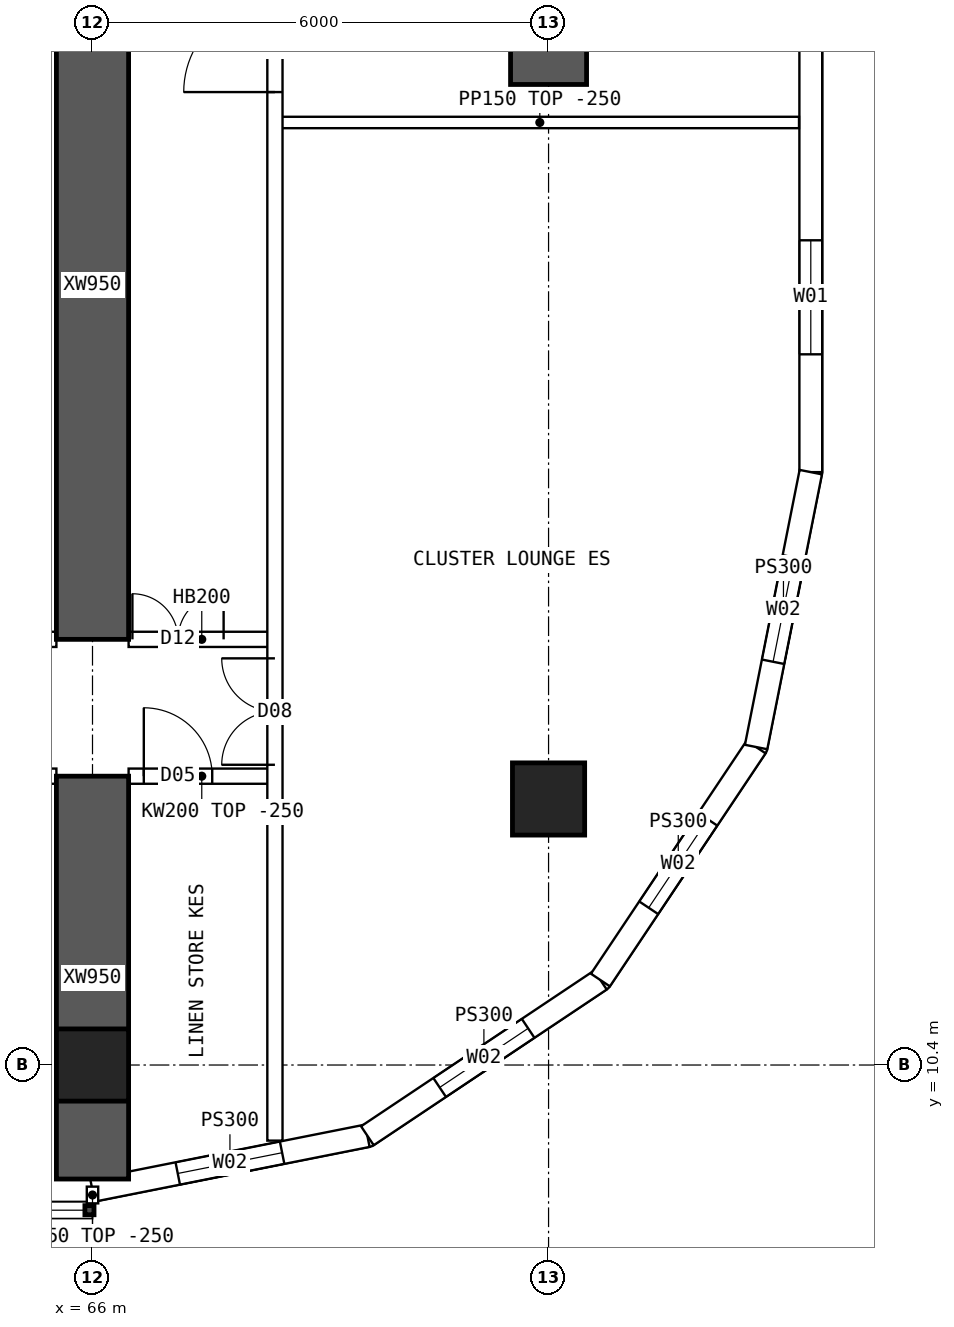
"""IFC4 building model, lengths in metres.
Left out: names, types, materials, properties, quantities, classifications, styles, units other than length and angle.
Written with IfcOpenShell. Run it as: python <this file> out.ifc"""

import sys

from ifc_helpers import new_model, si_unit, direction, frame, frame_2d, origin, origin_2d, place, context, subcontext, project, spatial, polyline, rectangle, hollow_rectangle, outline, extrude, element, fill, save


model = new_model("IFC4")
c1 = context("Model", 3, precision=1e-05, world=origin(), true_north=direction((0.0, 1.0)))
c2 = subcontext(c1, "Body", "Model", "MODEL_VIEW")
j1 = project(units=[si_unit("LENGTHUNIT", "METRE"), si_unit("PLANEANGLEUNIT", "RADIAN")], contexts=[c1])
p1 = place(None, origin())
s1 = spatial("IfcSite", under=j1, at=p1, CompositionType="ELEMENT")
p2 = place(p1, origin())
s2 = spatial("IfcBuilding", under=s1, at=p2, CompositionType="ELEMENT")
p3 = place(p2, frame((0.0, 0.0, 114.4)))
s3 = spatial("IfcBuildingStorey", under=s2, at=p3, CompositionType="ELEMENT", Elevation=114.4)
for number, where, z_axis, x_axis in (
    (1, (66.0, 10.4, 0.0), (0.0, 0.0, 1.0), (1.0, 0.0, 0.0)),
    (2, (72.0, 13.9, 0.0), (0.0, 0.0, 1.0), (1.0, 0.0, 0.0)),
):
    element("IfcColumn", number, at=place(p3, frame(where, z_axis=z_axis, x_axis=x_axis)), inside=s3, PredefinedType="COLUMN", context=c2, shape_type="SweptSolid", body=[
        extrude(hollow_rectangle(XDim=0.95, YDim=0.95, WallThickness=0.095, at=origin_2d()), origin(), (0.0, 0.0, 1.0), 3.75),
    ])
p4 = place(p3, frame((72.0, 23.3, 0.0), z_axis=(0.0, 0.0, 1.0), x_axis=(0.0, 1.0, 0.0)))
e3 = element("IfcWall", 3, at=p4, inside=s3, PredefinedType="SHEAR", context=c2, shape_type="SweptSolid", body=[
    extrude(rectangle(XDim=5.0, YDim=1.0, at=frame_2d((2.5, 0.0))), origin(), (0.0, 0.0, 1.0), 3.75),
])
p5 = place(p3, frame((66.0, 8.9, 0.0), z_axis=(0.0, 0.0, 1.0), x_axis=(0.0, 1.0, 0.0)))
e4 = element("IfcWall", 4, at=p5, inside=s3, PredefinedType="SHEAR", context=c2, shape_type="SweptSolid", body=[
    extrude(rectangle(XDim=5.3, YDim=0.95, at=frame_2d((2.65, 0.0))), origin(), (0.0, 0.0, 1.0), 3.75),
])
p6 = place(p3, frame((66.0, 16.0, 0.0), z_axis=(0.0, 0.0, 1.0), x_axis=(0.0, 1.0, 0.0)))
e5 = element("IfcWall", 5, at=p6, inside=s3, PredefinedType="SHEAR", context=c2, shape_type="SweptSolid", body=[
    extrude(rectangle(XDim=9.325, YDim=0.95, at=frame_2d((4.663, 0.0))), origin(), (0.0, 0.0, 1.0), 3.75),
])
p7 = place(p3, frame((75.45, 18.2, 0.0), z_axis=(0.0, 0.0, 1.0), x_axis=(0.0, 1.0, 0.0)))
e6 = element("IfcWall", 6, at=p7, inside=s3, PredefinedType="SOLIDWALL", context=c2, shape_type="SweptSolid", body=[
    extrude(outline(polyline([(-0.015, -0.15), (27.615, -0.15), (27.585, 0.15), (0.015, 0.15), (-0.015, -0.15)])), origin(), (0.0, 0.0, 1.0), 3.5),
])
p8 = place(p7, frame((1.55, 0.0, 0.9)))
e7 = element("IfcOpeningElement", 7, at=p8, cuts=e6, PredefinedType="OPENING", context=c2, shape_type="SweptSolid", body=[
    extrude(rectangle(XDim=1.5, YDim=2.0, at=frame_2d((0.75, 1.0))), frame((0.0, 0.16, 0.0), z_axis=(0.0, -1.0, 0.0), x_axis=(1.0, 0.0, 0.0)), (0.0, 0.0, 1.0), 0.32),
])
p9 = place(p7, frame((6.15, 0.0, 0.9)))
e8 = element("IfcOpeningElement", 8, at=p9, cuts=e6, PredefinedType="OPENING", context=c2, shape_type="SweptSolid", body=[
    extrude(rectangle(XDim=1.5, YDim=2.0, at=frame_2d((0.75, 1.0))), frame((0.0, 0.16, 0.0), z_axis=(0.0, -1.0, 0.0), x_axis=(1.0, 0.0, 0.0)), (0.0, 0.0, 1.0), 0.32),
])
p10 = place(p7, frame((10.75, 0.0, 0.9)))
e9 = element("IfcOpeningElement", 9, at=p10, cuts=e6, PredefinedType="OPENING", context=c2, shape_type="SweptSolid", body=[
    extrude(rectangle(XDim=1.5, YDim=2.0, at=frame_2d((0.75, 1.0))), frame((0.0, 0.16, 0.0), z_axis=(0.0, -1.0, 0.0), x_axis=(1.0, 0.0, 0.0)), (0.0, 0.0, 1.0), 0.32),
])
p11 = place(p7, frame((15.35, 0.0, 0.9)))
e10 = element("IfcOpeningElement", 10, at=p11, cuts=e6, PredefinedType="OPENING", context=c2, shape_type="SweptSolid", body=[
    extrude(rectangle(XDim=1.5, YDim=2.0, at=frame_2d((0.75, 1.0))), frame((0.0, 0.16, 0.0), z_axis=(0.0, -1.0, 0.0), x_axis=(1.0, 0.0, 0.0)), (0.0, 0.0, 1.0), 0.32),
])
p12 = place(p7, frame((19.95, 0.0, 0.9)))
e11 = element("IfcOpeningElement", 11, at=p12, cuts=e6, PredefinedType="OPENING", context=c2, shape_type="SweptSolid", body=[
    extrude(rectangle(XDim=1.5, YDim=2.0, at=frame_2d((0.75, 1.0))), frame((0.0, 0.16, 0.0), z_axis=(0.0, -1.0, 0.0), x_axis=(1.0, 0.0, 0.0)), (0.0, 0.0, 1.0), 0.32),
])
p13 = place(p7, frame((24.55, 0.0, 0.9)))
e12 = element("IfcOpeningElement", 12, at=p13, cuts=e6, PredefinedType="OPENING", context=c2, shape_type="SweptSolid", body=[
    extrude(rectangle(XDim=1.5, YDim=2.0, at=frame_2d((0.75, 1.0))), frame((0.0, 0.16, 0.0), z_axis=(0.0, -1.0, 0.0), x_axis=(1.0, 0.0, 0.0)), (0.0, 0.0, 1.0), 0.32),
])
p14 = place(p3, frame((66.0, 8.75, 0.0), z_axis=(0.0, 0.0, 1.0), x_axis=(0.980791473772, 0.195059183267, 0.0)))
e13 = element("IfcWall", 13, at=p14, inside=s3, PredefinedType="SOLIDWALL", context=c2, shape_type="SweptSolid", body=[
    extrude(outline(polyline([(-0.03, -0.15), (3.717, -0.15), (3.657, 0.15), (0.03, 0.15), (-0.03, -0.15)])), origin(), (0.0, 0.0, 1.0), 3.5),
])
p15 = place(p14, frame((1.144, 0.0, 0.9)))
e14 = element("IfcOpeningElement", 14, at=p15, cuts=e13, PredefinedType="OPENING", context=c2, shape_type="SweptSolid", body=[
    extrude(rectangle(XDim=1.4, YDim=1.8, at=frame_2d((0.7, 0.9))), frame((0.0, 0.16, 0.0), z_axis=(0.0, -1.0, 0.0), x_axis=(1.0, 0.0, 0.0)), (0.0, 0.0, 1.0), 0.32),
])
p16 = place(p3, frame((69.616, 9.469, 0.0), z_axis=(0.0, 0.0, 1.0), x_axis=(0.831448786846, 0.555601399253, 0.0)))
e15 = element("IfcWall", 15, at=p16, inside=s3, PredefinedType="SOLIDWALL", context=c2, shape_type="SweptSolid", body=[
    extrude(outline(polyline([(-0.03, -0.15), (3.717, -0.15), (3.657, 0.15), (0.03, 0.15), (-0.03, -0.15)])), origin(), (0.0, 0.0, 1.0), 3.5),
])
p17 = place(p16, frame((1.144, 0.0, 0.9)))
e16 = element("IfcOpeningElement", 16, at=p17, cuts=e15, PredefinedType="OPENING", context=c2, shape_type="SweptSolid", body=[
    extrude(rectangle(XDim=1.4, YDim=1.8, at=frame_2d((0.7, 0.9))), frame((0.0, 0.16, 0.0), z_axis=(0.0, -1.0, 0.0), x_axis=(1.0, 0.0, 0.0)), (0.0, 0.0, 1.0), 0.32),
])
p18 = place(p3, frame((72.682, 11.518, 0.0), z_axis=(0.0, 0.0, 1.0), x_axis=(0.555601399253, 0.831448786846, 0.0)))
e17 = element("IfcWall", 17, at=p18, inside=s3, PredefinedType="SOLIDWALL", context=c2, shape_type="SweptSolid", body=[
    extrude(outline(polyline([(-0.03, -0.15), (3.717, -0.15), (3.657, 0.15), (0.03, 0.15), (-0.03, -0.15)])), origin(), (0.0, 0.0, 1.0), 3.5),
])
p19 = place(p18, frame((1.144, 0.0, 0.9)))
e18 = element("IfcOpeningElement", 18, at=p19, cuts=e17, PredefinedType="OPENING", context=c2, shape_type="SweptSolid", body=[
    extrude(rectangle(XDim=1.4, YDim=1.8, at=frame_2d((0.7, 0.9))), frame((0.0, 0.16, 0.0), z_axis=(0.0, -1.0, 0.0), x_axis=(1.0, 0.0, 0.0)), (0.0, 0.0, 1.0), 0.32),
])
p20 = place(p3, frame((74.731, 14.583, 0.0), z_axis=(0.0, 0.0, 1.0), x_axis=(0.195059183267, 0.980791473772, 0.0)))
e19 = element("IfcWall", 19, at=p20, inside=s3, PredefinedType="SOLIDWALL", context=c2, shape_type="SweptSolid", body=[
    extrude(outline(polyline([(-0.03, -0.15), (3.702, -0.15), (3.672, 0.15), (0.03, 0.15), (-0.03, -0.15)])), origin(), (0.0, 0.0, 1.0), 3.5),
])
p21 = place(p20, frame((1.144, 0.0, 0.9)))
e20 = element("IfcOpeningElement", 20, at=p21, cuts=e19, PredefinedType="OPENING", context=c2, shape_type="SweptSolid", body=[
    extrude(rectangle(XDim=1.4, YDim=1.8, at=frame_2d((0.7, 0.9))), frame((0.0, 0.16, 0.0), z_axis=(0.0, -1.0, 0.0), x_axis=(1.0, 0.0, 0.0)), (0.0, 0.0, 1.0), 0.32),
])
p22 = place(p3, frame((60.475, 14.2, 0.0), z_axis=(0.0, 0.0, 1.0), x_axis=(1.0, 0.0, 0.0)))
e21 = element("IfcWall", 21, at=p22, inside=s3, PredefinedType="SOLIDWALL", context=c2, shape_type="SweptSolid", body=[
    extrude(outline(polyline([(0.0, 0.0), (5.05, 0.0), (5.05, 3.1), (0.0, 3.1), (0.0, 0.0)])), frame((0.0, 0.1, 0.0), z_axis=(0.0, -1.0, 0.0), x_axis=(1.0, 0.0, 0.0)), (0.0, 0.0, 1.0), 0.2),
])
p23 = place(p22, frame((0.1, 0.0, 0.0)))
e22 = element("IfcOpeningElement", 22, at=p23, cuts=e21, PredefinedType="OPENING", context=c2, shape_type="SweptSolid", body=[
    extrude(rectangle(XDim=0.9, YDim=2.1, at=frame_2d((0.45, 1.05))), frame((0.0, 0.11, 0.0), z_axis=(0.0, -1.0, 0.0), x_axis=(1.0, 0.0, 0.0)), (0.0, 0.0, 1.0), 0.22),
])
p24 = place(p22, frame((3.9, 0.0, 0.0)))
e23 = element("IfcOpeningElement", 23, at=p24, cuts=e21, PredefinedType="OPENING", context=c2, shape_type="SweptSolid", body=[
    extrude(rectangle(XDim=0.9, YDim=2.1, at=frame_2d((0.45, 1.05))), frame((0.0, 0.11, 0.0), z_axis=(0.0, -1.0, 0.0), x_axis=(1.0, 0.0, 0.0)), (0.0, 0.0, 1.0), 0.22),
])
p25 = place(p3, frame((60.475, 16.0, 0.0), z_axis=(0.0, 0.0, 1.0), x_axis=(1.0, 0.0, 0.0)))
e24 = element("IfcWall", 24, at=p25, inside=s3, PredefinedType="SOLIDWALL", context=c2, shape_type="SweptSolid", body=[
    extrude(rectangle(XDim=5.05, YDim=0.2, at=frame_2d((2.525, 0.0))), origin(), (0.0, 0.0, 1.0), 3.5),
])
p26 = place(p25, frame((0.15, 0.0, 0.0)))
e25 = element("IfcOpeningElement", 25, at=p26, cuts=e24, PredefinedType="OPENING", context=c2, shape_type="SweptSolid", body=[
    extrude(rectangle(XDim=0.9, YDim=2.1, at=frame_2d((0.45, 1.05))), frame((0.0, 0.11, 0.0), z_axis=(0.0, -1.0, 0.0), x_axis=(1.0, 0.0, 0.0)), (0.0, 0.0, 1.0), 0.22),
])
p27 = place(p25, frame((3.235, 0.0, 0.0)))
e26 = element("IfcOpeningElement", 26, at=p27, cuts=e24, PredefinedType="OPENING", context=c2, shape_type="SweptSolid", body=[
    extrude(rectangle(XDim=0.9, YDim=2.1, at=frame_2d((0.45, 1.05))), frame((0.0, 0.11, 0.0), z_axis=(0.0, -1.0, 0.0), x_axis=(1.0, 0.0, 0.0)), (0.0, 0.0, 1.0), 0.22),
])
p28 = place(p3, frame((66.475, 14.2, 0.0), z_axis=(0.0, 0.0, 1.0), x_axis=(1.0, 0.0, 0.0)))
e27 = element("IfcWall", 27, at=p28, inside=s3, PredefinedType="SOLIDWALL", context=c2, shape_type="SweptSolid", body=[
    extrude(rectangle(XDim=1.925, YDim=0.2, at=frame_2d((0.962, 0.0))), origin(), (0.0, 0.0, 1.0), 3.5),
])
p29 = place(p28, frame((0.2, 0.0, 0.0)))
e28 = element("IfcOpeningElement", 28, at=p29, cuts=e27, PredefinedType="OPENING", context=c2, shape_type="SweptSolid", body=[
    extrude(rectangle(XDim=0.9, YDim=2.1, at=frame_2d((0.45, 1.05))), frame((0.0, 0.11, 0.0), z_axis=(0.0, -1.0, 0.0), x_axis=(1.0, 0.0, 0.0)), (0.0, 0.0, 1.0), 0.22),
])
p30 = place(p3, frame((66.475, 16.0, 0.0), z_axis=(0.0, 0.0, 1.0), x_axis=(1.0, 0.0, 0.0)))
e29 = element("IfcWall", 29, at=p30, inside=s3, PredefinedType="SOLIDWALL", context=c2, shape_type="SweptSolid", body=[
    extrude(rectangle(XDim=1.925, YDim=0.2, at=frame_2d((0.962, 0.0))), origin(), (0.0, 0.0, 1.0), 3.5),
])
p31 = place(p30, frame((0.05, 0.0, 0.0)))
e30 = element("IfcOpeningElement", 30, at=p31, cuts=e29, PredefinedType="OPENING", context=c2, shape_type="SweptSolid", body=[
    extrude(rectangle(XDim=1.2, YDim=2.1, at=frame_2d((0.6, 1.05))), frame((0.0, 0.11, 0.0), z_axis=(0.0, -1.0, 0.0), x_axis=(1.0, 0.0, 0.0)), (0.0, 0.0, 1.0), 0.22),
])
p32 = place(p3, frame((68.4, 9.405, 0.0), z_axis=(0.0, 0.0, 1.0), x_axis=(0.0, 1.0, 0.0)))
e31 = element("IfcWall", 31, at=p32, inside=s3, PredefinedType="SOLIDWALL", context=c2, shape_type="SweptSolid", body=[
    extrude(rectangle(XDim=45.189, YDim=0.2, at=frame_2d((22.595, 0.0))), origin(), (0.0, 0.0, 1.0), 3.5),
])
p33 = place(p32, frame((13.795, 0.0, 0.0)))
e32 = element("IfcOpeningElement", 32, at=p33, cuts=e31, PredefinedType="OPENING", context=c2, shape_type="SweptSolid", body=[
    extrude(rectangle(XDim=1.2, YDim=2.1, at=frame_2d((0.6, 1.05))), frame((0.0, 0.11, 0.0), z_axis=(0.0, -1.0, 0.0), x_axis=(1.0, 0.0, 0.0)), (0.0, 0.0, 1.0), 0.22),
])
p34 = place(p32, frame((4.945, 0.0, 0.0)))
e33 = element("IfcOpeningElement", 33, at=p34, cuts=e31, PredefinedType="OPENING", context=c2, shape_type="SweptSolid", body=[
    extrude(rectangle(XDim=1.4, YDim=2.1, at=frame_2d((0.7, 1.05))), frame((0.0, 0.11, 0.0), z_axis=(0.0, -1.0, 0.0), x_axis=(1.0, 0.0, 0.0)), (0.0, 0.0, 1.0), 0.22),
])
p35 = place(p32, frame((38.745, 0.0, 0.0)))
e34 = element("IfcOpeningElement", 34, at=p35, cuts=e31, PredefinedType="OPENING", context=c2, shape_type="SweptSolid", body=[
    extrude(rectangle(XDim=1.4, YDim=2.1, at=frame_2d((0.7, 1.05))), frame((0.0, 0.11, 0.0), z_axis=(0.0, -1.0, 0.0), x_axis=(1.0, 0.0, 0.0)), (0.0, 0.0, 1.0), 0.22),
])
p36 = place(p3, frame((68.475, 22.8, 0.0), z_axis=(0.0, 0.0, 1.0), x_axis=(1.0, 0.0, 0.0)))
e35 = element("IfcWall", 35, at=p36, inside=s3, PredefinedType="PARTITIONING", context=c2, shape_type="SweptSolid", body=[
    extrude(outline(polyline([(0.0, 0.0), (6.82, 0.0), (6.82, 3.5), (3.827, 3.5), (3.825, 3.05), (3.227, 3.05), (3.225, 3.5), (0.0, 3.5), (0.0, 0.0)])), frame((0.0, 0.075, 0.0), z_axis=(0.0, -1.0, 0.0), x_axis=(1.0, 0.0, 0.0)), (0.0, 0.0, 1.0), 0.15),
])
p37 = place(p3, frame((66.0, 8.8, 0.0), z_axis=(0.0, 0.0, 1.0), x_axis=(0.0, -1.0, 0.0)))
e36 = element("IfcWall", 36, at=p37, inside=s3, PredefinedType="PARTITIONING", context=c2, shape_type="SweptSolid", body=[
    extrude(rectangle(XDim=0.22, YDim=0.15, at=frame_2d((0.11, 0.0))), origin(), (0.0, 0.0, 1.0), 3.5),
])
p38 = place(p8, origin())
e37 = element("IfcWindow", 37, at=p38, inside=s3, PartitioningType="SINGLE_PANEL", PredefinedType="WINDOW", context=c2, shape_type="SweptSolid", body=[
    extrude(rectangle(XDim=1.5, YDim=2.0, at=frame_2d((0.75, 1.0))), frame((0.0, 0.03, 0.0), z_axis=(0.0, -1.0, 0.0), x_axis=(1.0, 0.0, 0.0)), (0.0, 0.0, 1.0), 0.06),
])
fill(e7, e37)
p39 = place(p15, origin())
e38 = element("IfcWindow", 38, at=p39, inside=s3, PartitioningType="SINGLE_PANEL", PredefinedType="WINDOW", context=c2, shape_type="SweptSolid", body=[
    extrude(rectangle(XDim=1.4, YDim=1.8, at=frame_2d((0.7, 0.9))), frame((0.0, 0.03, 0.0), z_axis=(0.0, -1.0, 0.0), x_axis=(1.0, 0.0, 0.0)), (0.0, 0.0, 1.0), 0.06),
])
fill(e14, e38)
p40 = place(p17, origin())
e39 = element("IfcWindow", 39, at=p40, inside=s3, PartitioningType="SINGLE_PANEL", PredefinedType="WINDOW", context=c2, shape_type="SweptSolid", body=[
    extrude(rectangle(XDim=1.4, YDim=1.8, at=frame_2d((0.7, 0.9))), frame((0.0, 0.03, 0.0), z_axis=(0.0, -1.0, 0.0), x_axis=(1.0, 0.0, 0.0)), (0.0, 0.0, 1.0), 0.06),
])
fill(e16, e39)
p41 = place(p19, origin())
e40 = element("IfcWindow", 40, at=p41, inside=s3, PartitioningType="SINGLE_PANEL", PredefinedType="WINDOW", context=c2, shape_type="SweptSolid", body=[
    extrude(rectangle(XDim=1.4, YDim=1.8, at=frame_2d((0.7, 0.9))), frame((0.0, 0.03, 0.0), z_axis=(0.0, -1.0, 0.0), x_axis=(1.0, 0.0, 0.0)), (0.0, 0.0, 1.0), 0.06),
])
fill(e18, e40)
p42 = place(p21, origin())
e41 = element("IfcWindow", 41, at=p42, inside=s3, PartitioningType="SINGLE_PANEL", PredefinedType="WINDOW", context=c2, shape_type="SweptSolid", body=[
    extrude(rectangle(XDim=1.4, YDim=1.8, at=frame_2d((0.7, 0.9))), frame((0.0, 0.03, 0.0), z_axis=(0.0, -1.0, 0.0), x_axis=(1.0, 0.0, 0.0)), (0.0, 0.0, 1.0), 0.06),
])
fill(e20, e41)
p43 = place(p31, origin())
e42 = element("IfcDoor", 42, at=p43, inside=s3, OperationType="DOUBLE_DOOR_SINGLE_SWING", PredefinedType="DOOR", context=c2, shape_type="SweptSolid", body=[
    extrude(rectangle(XDim=1.2, YDim=2.1, at=frame_2d((0.6, 1.05))), frame((0.0, 0.025, 0.0), z_axis=(0.0, -1.0, 0.0), x_axis=(1.0, 0.0, 0.0)), (0.0, 0.0, 1.0), 0.05),
])
fill(e30, e42)
p44 = place(p33, origin())
e43 = element("IfcDoor", 43, at=p44, inside=s3, OperationType="SINGLE_SWING_LEFT", PredefinedType="DOOR", context=c2, shape_type="SweptSolid", body=[
    extrude(rectangle(XDim=1.2, YDim=2.1, at=frame_2d((0.6, 1.05))), frame((0.0, 0.025, 0.0), z_axis=(0.0, -1.0, 0.0), x_axis=(1.0, 0.0, 0.0)), (0.0, 0.0, 1.0), 0.05),
])
fill(e32, e43)
p45 = place(p34, origin())
e44 = element("IfcDoor", 44, at=p45, inside=s3, OperationType="DOUBLE_DOOR_SINGLE_SWING", PredefinedType="DOOR", context=c2, shape_type="SweptSolid", body=[
    extrude(rectangle(XDim=1.4, YDim=2.1, at=frame_2d((0.7, 1.05))), frame((0.0, 0.025, 0.0), z_axis=(0.0, -1.0, 0.0), x_axis=(1.0, 0.0, 0.0)), (0.0, 0.0, 1.0), 0.05),
])
fill(e33, e44)
p46 = place(p29, origin())
e45 = element("IfcDoor", 45, at=p46, inside=s3, OperationType="SINGLE_SWING_LEFT", PredefinedType="DOOR", context=c2, shape_type="SweptSolid", body=[
    extrude(rectangle(XDim=0.9, YDim=2.1, at=frame_2d((0.45, 1.05))), frame((0.0, 0.025, 0.0), z_axis=(0.0, -1.0, 0.0), x_axis=(1.0, 0.0, 0.0)), (0.0, 0.0, 1.0), 0.05),
])
fill(e28, e45)
save(model, sys.argv[1])
